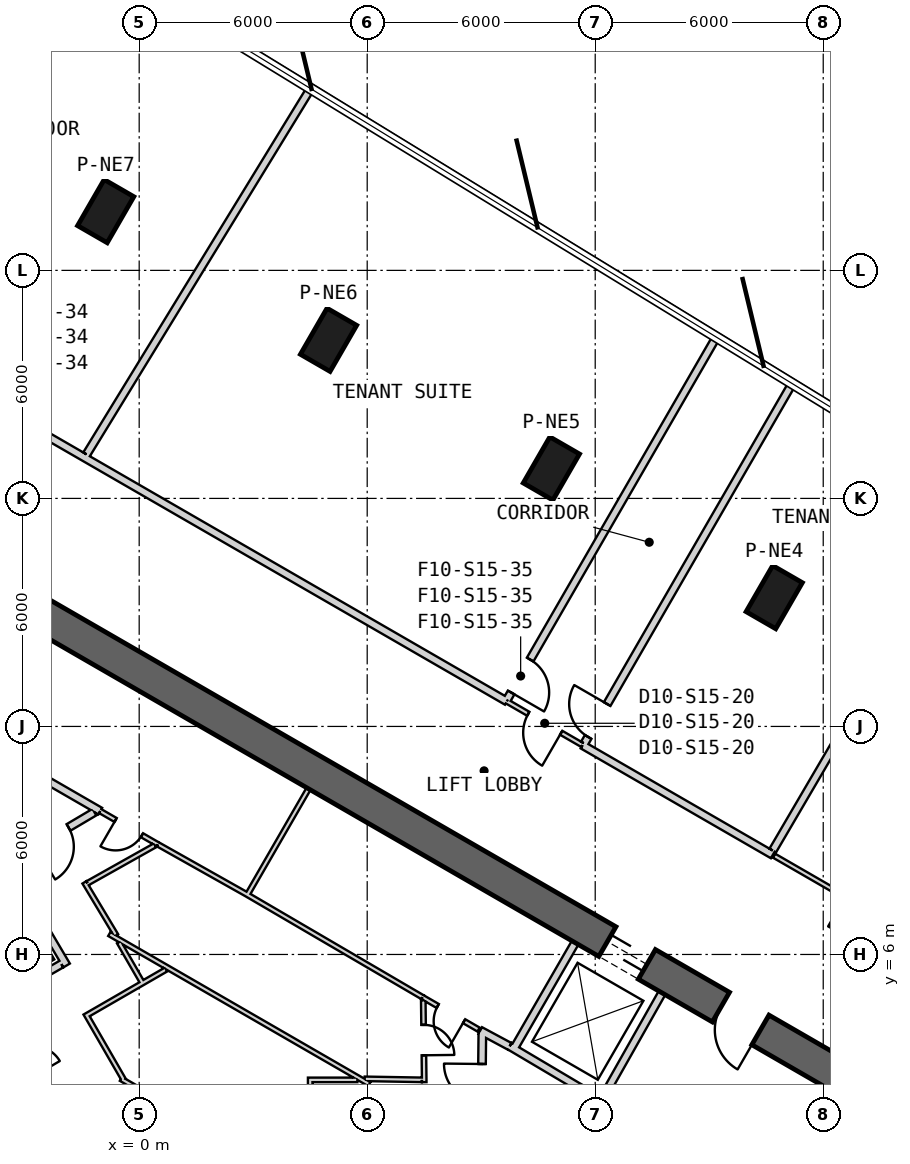
"""IFC4 building model, lengths in metres.
Left out: names, types, materials, properties, quantities, classifications, styles, units other than length and angle.
Written with IfcOpenShell. Run it as: python <this file> out.ifc"""

import sys

from ifc_helpers import new_model, si_unit, direction, frame, frame_2d, origin, origin_2d, place, context, subcontext, project, spatial, rectangle, extrude, element, fill, save


model = new_model("IFC4")
c1 = context("Model", 3, precision=1e-05, world=origin(), true_north=direction((0.0, 1.0)))
c2 = subcontext(c1, "Body", "Model", "MODEL_VIEW")
j1 = project(units=[si_unit("LENGTHUNIT", "METRE"), si_unit("PLANEANGLEUNIT", "RADIAN")], contexts=[c1])
p1 = place(None, origin())
s1 = spatial("IfcSite", under=j1, at=p1, CompositionType="ELEMENT")
p2 = place(p1, origin())
s2 = spatial("IfcBuilding", under=s1, at=p2, CompositionType="ELEMENT")
p3 = place(p2, frame((0.0, 0.0, 241.2)))
s3 = spatial("IfcBuildingStorey", under=s2, at=p3, CompositionType="ELEMENT", Elevation=241.2)
for number, where, z_axis, x_axis in (
    (1, (16.71, 15.401, 0.0), (0.0, 0.0, 1.0), (0.5, 0.866, 0.0)),
    (2, (10.847, 18.787, 0.0), (0.0, 0.0, 1.0), (0.5, 0.866, 0.0)),
    (3, (4.983, 22.172, 0.0), (0.0, 0.0, 1.0), (0.5, 0.866, 0.0)),
    (4, (-0.881, 25.558, 0.0), (0.0, 0.0, 1.0), (0.5, 0.866, 0.0)),
):
    element("IfcColumn", number, at=place(p3, frame(where, z_axis=z_axis, x_axis=x_axis)), inside=s3, PredefinedType="COLUMN", context=c2, shape_type="SweptSolid", body=[
        extrude(rectangle(XDim=1.4, YDim=0.9, at=origin_2d()), origin(), (0.0, 0.0, 1.0), 4.0),
    ])
p4 = place(p3, frame((19.475, 2.208, 0.0), z_axis=(0.0, 0.0, 1.0), x_axis=(-0.866028369851, 0.499994862586, 0.0)))
e5 = element("IfcWall", 5, at=p4, inside=s3, PredefinedType="SHEAR", context=c2, shape_type="SweptSolid", body=[
    extrude(rectangle(XDim=31.523, YDim=0.9, at=frame_2d((15.762, 0.0))), origin(), (0.0, 0.0, 1.0), 4.0),
])
p5 = place(p4, frame((7.062, 0.0, 0.0)))
e6 = element("IfcOpeningElement", 6, at=p5, cuts=e5, PredefinedType="OPENING", context=c2, shape_type="SweptSolid", body=[
    extrude(rectangle(XDim=1.2, YDim=2.4, at=frame_2d((0.6, 1.2))), frame((0.0, 0.46, 0.0), z_axis=(0.0, -1.0, 0.0), x_axis=(1.0, 0.0, 0.0)), (0.0, 0.0, 1.0), 0.92),
])
p6 = place(p4, frame((3.612, 0.0, 0.0)))
e7 = element("IfcOpeningElement", 7, at=p6, cuts=e5, PredefinedType="OPENING", context=c2, shape_type="SweptSolid", body=[
    extrude(rectangle(XDim=1.2, YDim=2.4, at=frame_2d((0.6, 1.2))), frame((0.0, 0.46, 0.0), z_axis=(0.0, -1.0, 0.0), x_axis=(1.0, 0.0, 0.0)), (0.0, 0.0, 1.0), 0.92),
])
p7 = place(p4, frame((26.712, 0.0, 0.0)))
e8 = element("IfcOpeningElement", 8, at=p7, cuts=e5, PredefinedType="OPENING", context=c2, shape_type="SweptSolid", body=[
    extrude(rectangle(XDim=1.2, YDim=2.4, at=frame_2d((0.6, 1.2))), frame((0.0, 0.46, 0.0), z_axis=(0.0, -1.0, 0.0), x_axis=(1.0, 0.0, 0.0)), (0.0, 0.0, 1.0), 0.92),
])
p8 = place(p3, frame((9.847, 3.495, 0.0), z_axis=(0.0, 0.0, 1.0), x_axis=(0.499984717929, 0.866034226713, 0.0)))
e9 = element("IfcWall", 9, at=p8, inside=s3, PredefinedType="PLUMBINGWALL", context=c2, shape_type="SweptSolid", body=[
    extrude(rectangle(XDim=3.25, YDim=0.2, at=frame_2d((1.625, 0.0))), origin(), (0.0, 0.0, 1.0), 3.7),
])
p9 = place(p3, frame((12.11, 2.073, 0.0), z_axis=(0.0, 0.0, 1.0), x_axis=(0.49196600604, 0.870614408852, 0.0)))
e10 = element("IfcWall", 10, at=p9, inside=s3, PredefinedType="PLUMBINGWALL", context=c2, shape_type="SweptSolid", body=[
    extrude(rectangle(XDim=3.35, YDim=0.2, at=frame_2d((1.675, 0.0))), origin(), (0.0, 0.0, 1.0), 3.7),
])
p10 = place(p3, frame((12.073, 2.211, 0.0), z_axis=(0.0, 0.0, 1.0), x_axis=(-0.860414880418, 0.509594185166, 0.0)))
e11 = element("IfcWall", 11, at=p10, inside=s3, PredefinedType="PLUMBINGWALL", context=c2, shape_type="SweptSolid", body=[
    extrude(rectangle(XDim=2.7, YDim=0.2, at=frame_2d((1.35, 0.0))), origin(), (0.0, 0.0, 1.0), 3.7),
])
p11 = place(p3, frame((-3.538, 8.465, 0.0), z_axis=(0.0, 0.0, 1.0), x_axis=(0.508616218331, -0.860993346345, 0.0)))
e12 = element("IfcWall", 12, at=p11, inside=s3, PredefinedType="PLUMBINGWALL", context=c2, shape_type="SweptSolid", body=[
    extrude(rectangle(XDim=3.2, YDim=0.2, at=frame_2d((1.6, 0.0))), origin(), (0.0, 0.0, 1.0), 3.7),
])
p12 = place(p3, frame((-2.047, 5.746, 0.0), z_axis=(0.0, 0.0, 1.0), x_axis=(-0.866019606374, -0.500010041276, 0.0)))
e13 = element("IfcWall", 13, at=p12, inside=s3, PredefinedType="PLUMBINGWALL", context=c2, shape_type="SweptSolid", body=[
    extrude(rectangle(XDim=2.205, YDim=0.2, at=frame_2d((1.102, 0.0))), origin(), (0.0, 0.0, 1.0), 3.7),
])
p13 = place(p3, frame((4.457, 10.359, 0.0), z_axis=(0.0, 0.0, 1.0), x_axis=(-0.500017246033, -0.866015446554, 0.0)))
e14 = element("IfcWall", 14, at=p13, inside=s3, PredefinedType="PARTITIONING", context=c2, shape_type="SweptSolid", body=[
    extrude(rectangle(XDim=3.25, YDim=0.12, at=frame_2d((1.625, 0.0))), origin(), (0.0, 0.0, 1.0), 3.7),
])
p14 = place(p3, frame((8.974, 3.999, 0.0), z_axis=(0.0, 0.0, 1.0), x_axis=(0.880917147855, -0.473270513147, 0.0)))
e15 = element("IfcWall", 15, at=p14, inside=s3, PredefinedType="PARTITIONING", context=c2, shape_type="SweptSolid", body=[
    extrude(rectangle(XDim=0.878, YDim=0.2, at=frame_2d((0.439, 0.0))), origin(), (0.0, 0.0, 1.0), 3.7),
])
p15 = place(p3, frame((2.821, 7.586, 0.0), z_axis=(0.0, 0.0, 1.0), x_axis=(0.863262357411, -0.504755487615, 0.0)))
e16 = element("IfcWall", 16, at=p15, inside=s3, PredefinedType="PARTITIONING", context=c2, shape_type="SweptSolid", body=[
    extrude(rectangle(XDim=5.37, YDim=0.12, at=frame_2d((2.685, 0.0))), origin(), (0.0, 0.0, 1.0), 3.7),
])
p16 = place(p3, frame((-1.024, 9.771, 0.0), z_axis=(0.0, 0.0, 1.0), x_axis=(0.866039397417, -0.499975761534, 0.0)))
e17 = element("IfcWall", 17, at=p16, inside=s3, PredefinedType="PARTITIONING", context=c2, shape_type="SweptSolid", body=[
    extrude(rectangle(XDim=1.752, YDim=0.12, at=frame_2d((0.876, 0.0))), origin(), (0.0, 0.0, 1.0), 3.7),
])
p17 = place(p16, frame((0.466, 0.0, 0.0)))
e18 = element("IfcOpeningElement", 18, at=p17, cuts=e17, PredefinedType="OPENING", context=c2, shape_type="SweptSolid", body=[
    extrude(rectangle(XDim=0.8, YDim=2.1, at=frame_2d((0.4, 1.05))), frame((0.0, 0.07, 0.0), z_axis=(0.0, -1.0, 0.0), x_axis=(1.0, 0.0, 0.0)), (0.0, 0.0, 1.0), 0.14),
])
p18 = place(p3, frame((7.457, 4.875, 0.0), z_axis=(0.0, 0.0, 1.0), x_axis=(0.866027945518, -0.499995597562, 0.0)))
e19 = element("IfcWall", 19, at=p18, inside=s3, PredefinedType="PARTITIONING", context=c2, shape_type="SweptSolid", body=[
    extrude(rectangle(XDim=1.702, YDim=0.12, at=frame_2d((0.851, 0.0))), origin(), (0.0, 0.0, 1.0), 3.7),
])
p19 = place(p18, frame((0.461, 0.0, 0.0)))
e20 = element("IfcOpeningElement", 20, at=p19, cuts=e19, PredefinedType="OPENING", context=c2, shape_type="SweptSolid", body=[
    extrude(rectangle(XDim=0.8, YDim=2.1, at=frame_2d((0.4, 1.05))), frame((0.0, 0.07, 0.0), z_axis=(0.0, -1.0, 0.0), x_axis=(1.0, 0.0, 0.0)), (0.0, 0.0, 1.0), 0.14),
])
p20 = place(p3, frame((-4.296, 11.66, 0.0), z_axis=(0.0, 0.0, 1.0), x_axis=(0.866027389382, -0.499996560828, 0.0)))
e21 = element("IfcWall", 21, at=p20, inside=s3, PredefinedType="PARTITIONING", context=c2, shape_type="SweptSolid", body=[
    extrude(rectangle(XDim=3.778, YDim=0.2, at=frame_2d((1.889, 0.0))), origin(), (0.0, 0.0, 1.0), 3.7),
])
p21 = place(p3, frame((0.494, 8.896, 0.0), z_axis=(0.0, 0.0, 1.0), x_axis=(0.871426548871, -0.490526013503, 0.0)))
e22 = element("IfcWall", 22, at=p21, inside=s3, PredefinedType="PARTITIONING", context=c2, shape_type="SweptSolid", body=[
    extrude(rectangle(XDim=2.67, YDim=0.12, at=frame_2d((1.335, 0.0))), origin(), (0.0, 0.0, 1.0), 3.7),
])
p22 = place(p3, frame((9.001, 1.27, 0.0), z_axis=(0.0, 0.0, 1.0), x_axis=(0.010723968736, 0.999942496594, 0.0)))
e23 = element("IfcWall", 23, at=p22, inside=s3, PredefinedType="PARTITIONING", context=c2, shape_type="SweptSolid", body=[
    extrude(rectangle(XDim=2.709, YDim=0.2, at=frame_2d((1.354, 0.0))), origin(), (0.0, 0.0, 1.0), 3.7),
])
p23 = place(p22, frame((0.848, 0.0, 0.0)))
e24 = element("IfcOpeningElement", 24, at=p23, cuts=e23, PredefinedType="OPENING", context=c2, shape_type="SweptSolid", body=[
    extrude(rectangle(XDim=1.0, YDim=2.1, at=frame_2d((0.5, 1.05))), frame((0.0, 0.11, 0.0), z_axis=(0.0, -1.0, 0.0), x_axis=(1.0, 0.0, 0.0)), (0.0, 0.0, 1.0), 0.22),
])
p24 = place(p3, frame((-1.179, 9.745, 0.0), z_axis=(0.0, 0.0, 1.0), x_axis=(-0.860630814782, -0.509229418482, 0.0)))
e25 = element("IfcWall", 25, at=p24, inside=s3, PredefinedType="PARTITIONING", context=c2, shape_type="SweptSolid", body=[
    extrude(rectangle(XDim=2.582, YDim=0.2, at=frame_2d((1.291, 0.0))), origin(), (0.0, 0.0, 1.0), 3.7),
])
p25 = place(p24, frame((0.791, 0.0, 0.0)))
e26 = element("IfcOpeningElement", 26, at=p25, cuts=e25, PredefinedType="OPENING", context=c2, shape_type="SweptSolid", body=[
    extrude(rectangle(XDim=1.0, YDim=2.1, at=frame_2d((0.5, 1.05))), frame((0.0, 0.11, 0.0), z_axis=(0.0, -1.0, 0.0), x_axis=(1.0, 0.0, 0.0)), (0.0, 0.0, 1.0), 0.22),
])
p26 = place(p3, frame((-2.057, 1.565, 0.0), z_axis=(0.0, 0.0, 1.0), x_axis=(-0.507299271879, 0.861769951176, 0.0)))
e27 = element("IfcWall", 27, at=p26, inside=s3, PredefinedType="PLUMBINGWALL", context=c2, shape_type="SweptSolid", body=[
    extrude(rectangle(XDim=3.516, YDim=0.15, at=frame_2d((1.758, 0.0))), origin(), (0.0, 0.0, 1.0), 3.7),
])
p27 = place(p26, frame((1.422, 0.0, 0.0)))
e28 = element("IfcOpeningElement", 28, at=p27, cuts=e27, PredefinedType="OPENING", context=c2, shape_type="SweptSolid", body=[
    extrude(rectangle(XDim=0.8, YDim=2.1, at=frame_2d((0.4, 1.05))), frame((0.0, 0.085, 0.0), z_axis=(0.0, -1.0, 0.0), x_axis=(1.0, 0.0, 0.0)), (0.0, 0.0, 1.0), 0.17),
])
p28 = place(p3, frame((-0.786, 6.538, 0.0), z_axis=(0.0, 0.0, 1.0), x_axis=(0.866034288228, -0.499984611377, 0.0)))
e29 = element("IfcWall", 29, at=p28, inside=s3, PredefinedType="PARTITIONING", context=c2, shape_type="SweptSolid", body=[
    extrude(rectangle(XDim=7.9, YDim=0.12, at=frame_2d((3.95, 0.0))), origin(), (0.0, 0.0, 1.0), 3.7),
])
p29 = place(p3, frame((4.44, 2.7, 0.0), z_axis=(0.0, 0.0, 1.0), x_axis=(1.0, 0.0, 0.0)))
e30 = element("IfcWall", 30, at=p29, inside=s3, PredefinedType="PARTITIONING", context=c2, shape_type="SweptSolid", body=[
    extrude(rectangle(XDim=1.302, YDim=0.12, at=frame_2d((0.651, 0.0))), origin(), (0.0, 0.0, 1.0), 3.7),
])
p30 = place(p3, frame((4.5, 0.94, 0.0), z_axis=(0.0, 0.0, 1.0), x_axis=(0.0, 1.0, 0.0)))
e31 = element("IfcWall", 31, at=p30, inside=s3, PredefinedType="PARTITIONING", context=c2, shape_type="SweptSolid", body=[
    extrude(rectangle(XDim=1.7, YDim=0.12, at=frame_2d((0.85, 0.0))), origin(), (0.0, 0.0, 1.0), 3.7),
])
p31 = place(p3, frame((-0.48, 2.727, 0.0), z_axis=(0.0, 0.0, 1.0), x_axis=(0.86601279846, -0.500021832428, 0.0)))
e32 = element("IfcWall", 32, at=p31, inside=s3, PredefinedType="PARTITIONING", context=c2, shape_type="SweptSolid", body=[
    extrude(rectangle(XDim=3.435, YDim=0.12, at=frame_2d((1.718, 0.0))), origin(), (0.0, 0.0, 1.0), 3.7),
])
p32 = place(p31, frame((1.37, 0.0, 0.0)))
e33 = element("IfcOpeningElement", 33, at=p32, cuts=e32, PredefinedType="OPENING", context=c2, shape_type="SweptSolid", body=[
    extrude(rectangle(XDim=0.8, YDim=2.1, at=frame_2d((0.4, 1.05))), frame((0.0, 0.07, 0.0), z_axis=(0.0, -1.0, 0.0), x_axis=(1.0, 0.0, 0.0)), (0.0, 0.0, 1.0), 0.14),
])
p33 = place(p3, frame((-1.414, 4.449, 0.0), z_axis=(0.0, 0.0, 1.0), x_axis=(0.500097243556, -0.865969252911, 0.0)))
e34 = element("IfcWall", 34, at=p33, inside=s3, PredefinedType="PARTITIONING", context=c2, shape_type="SweptSolid", body=[
    extrude(rectangle(XDim=2.03, YDim=0.12, at=frame_2d((1.015, 0.0))), origin(), (0.0, 0.0, 1.0), 3.7),
])
p34 = place(p3, frame((0.709, 5.605, 0.0), z_axis=(0.0, 0.0, 1.0), x_axis=(-0.8660096254, -0.500027327967, 0.0)))
e35 = element("IfcWall", 35, at=p34, inside=s3, PredefinedType="PARTITIONING", context=c2, shape_type="SweptSolid", body=[
    extrude(rectangle(XDim=2.357, YDim=0.12, at=frame_2d((1.178, 0.0))), origin(), (0.0, 0.0, 1.0), 3.7),
])
p35 = place(p3, frame((-0.532, 6.322, 0.0), z_axis=(0.0, 0.0, 1.0), x_axis=(0.50005036918, -0.865996321171, 0.0)))
e36 = element("IfcWall", 36, at=p35, inside=s3, PredefinedType="PARTITIONING", context=c2, shape_type="SweptSolid", body=[
    extrude(rectangle(XDim=1.182, YDim=0.12, at=frame_2d((0.591, 0.0))), origin(), (0.0, 0.0, 1.0), 3.7),
])
p36 = place(p3, frame((-1.443, 7.897, 0.0), z_axis=(0.0, 0.0, 1.0), x_axis=(0.514937238613, -0.85722788119, 0.0)))
e37 = element("IfcWall", 37, at=p36, inside=s3, PredefinedType="PARTITIONING", context=c2, shape_type="SweptSolid", body=[
    extrude(rectangle(XDim=1.626, YDim=0.12, at=frame_2d((0.813, 0.0))), origin(), (0.0, 0.0, 1.0), 3.7),
])
p37 = place(p3, frame((0.414, 8.871, 0.0), z_axis=(0.0, 0.0, 1.0), x_axis=(-0.871809386997, -0.48984527429, 0.0)))
e38 = element("IfcWall", 38, at=p37, inside=s3, PredefinedType="PARTITIONING", context=c2, shape_type="SweptSolid", body=[
    extrude(rectangle(XDim=2.034, YDim=0.12, at=frame_2d((1.017, 0.0))), origin(), (0.0, 0.0, 1.0), 3.7),
])
p38 = place(p3, frame((7.501, 2.64, 0.0), z_axis=(0.0, 0.0, 1.0), x_axis=(-0.01178388431, 0.999930567625, 0.0)))
e39 = element("IfcWall", 39, at=p38, inside=s3, PredefinedType="PARTITIONING", context=c2, shape_type="SweptSolid", body=[
    extrude(rectangle(XDim=2.155, YDim=0.12, at=frame_2d((1.077, 0.0))), origin(), (0.0, 0.0, 1.0), 3.7),
])
p39 = place(p38, frame((0.707, 0.0, 0.0)))
e40 = element("IfcOpeningElement", 40, at=p39, cuts=e39, PredefinedType="OPENING", context=c2, shape_type="SweptSolid", body=[
    extrude(rectangle(XDim=0.8, YDim=2.1, at=frame_2d((0.4, 1.05))), frame((0.0, 0.07, 0.0), z_axis=(0.0, -1.0, 0.0), x_axis=(1.0, 0.0, 0.0)), (0.0, 0.0, 1.0), 0.14),
])
p40 = place(p3, frame((5.934, 2.727, 0.0), z_axis=(0.0, 0.0, 1.0), x_axis=(0.999846739959, -0.017507044085, 0.0)))
e41 = element("IfcWall", 41, at=p40, inside=s3, PredefinedType="PARTITIONING", context=c2, shape_type="SweptSolid", body=[
    extrude(rectangle(XDim=1.506, YDim=0.12, at=frame_2d((0.753, 0.0))), origin(), (0.0, 0.0, 1.0), 3.7),
])
p41 = place(p3, frame((21.229, 5.988, 0.0), z_axis=(0.0, 0.0, 1.0), x_axis=(-0.866024383922, 0.50000176645, 0.0)))
e42 = element("IfcWall", 42, at=p41, inside=s3, PredefinedType="PARTITIONING", context=c2, shape_type="SweptSolid", body=[
    extrude(rectangle(XDim=5.221, YDim=0.12, at=frame_2d((2.61, 0.0))), origin(), (0.0, 0.0, 1.0), 2.98),
])
p42 = place(p41, frame((2.16, 0.0, 0.0)))
e43 = element("IfcOpeningElement", 43, at=p42, cuts=e42, PredefinedType="OPENING", context=c2, shape_type="SweptSolid", body=[
    extrude(rectangle(XDim=0.9, YDim=2.1, at=frame_2d((0.45, 1.05))), frame((0.0, 0.07, 0.0), z_axis=(0.0, -1.0, 0.0), x_axis=(1.0, 0.0, 0.0)), (0.0, 0.0, 1.0), 0.14),
])
p43 = place(p3, frame((11.667, 11.508, 0.0), z_axis=(0.0, 0.0, 1.0), x_axis=(-0.866053019151, 0.499952165731, 0.0)))
e44 = element("IfcWall", 44, at=p43, inside=s3, PredefinedType="PARTITIONING", context=c2, shape_type="SweptSolid", body=[
    extrude(rectangle(XDim=2.3, YDim=0.12, at=frame_2d((1.15, 0.0))), origin(), (0.0, 0.0, 1.0), 3.7),
])
p44 = place(p43, frame((0.65, 0.0, 0.0)))
e45 = element("IfcOpeningElement", 45, at=p44, cuts=e44, PredefinedType="OPENING", context=c2, shape_type="SweptSolid", body=[
    extrude(rectangle(XDim=1.0, YDim=2.1, at=frame_2d((0.5, 1.05))), frame((0.0, 0.07, 0.0), z_axis=(0.0, -1.0, 0.0), x_axis=(1.0, 0.0, 0.0)), (0.0, 0.0, 1.0), 0.14),
])
p45 = place(p3, frame((16.673, 8.618, 0.0), z_axis=(0.0, 0.0, 1.0), x_axis=(-0.866014659605, 0.500018609004, 0.0)))
e46 = element("IfcWall", 46, at=p45, inside=s3, PredefinedType="PARTITIONING", context=c2, shape_type="SweptSolid", body=[
    extrude(rectangle(XDim=5.78, YDim=0.2, at=frame_2d((2.89, 0.0))), origin(), (0.0, 0.0, 1.0), 2.98),
])
p46 = place(p3, frame((9.675, 12.658, 0.0), z_axis=(0.0, 0.0, 1.0), x_axis=(-0.866025327327, 0.500000132428, 0.0)))
e47 = element("IfcWall", 47, at=p46, inside=s3, PredefinedType="PARTITIONING", context=c2, shape_type="SweptSolid", body=[
    extrude(rectangle(XDim=18.443, YDim=0.2, at=frame_2d((9.222, 0.0))), origin(), (0.0, 0.0, 1.0), 2.98),
])
p47 = place(p46, frame((15.138, 0.0, 0.0)))
e48 = element("IfcOpeningElement", 48, at=p47, cuts=e47, PredefinedType="OPENING", context=c2, shape_type="SweptSolid", body=[
    extrude(rectangle(XDim=1.0, YDim=2.1, at=frame_2d((0.5, 1.05))), frame((0.0, 0.11, 0.0), z_axis=(0.0, -1.0, 0.0), x_axis=(1.0, 0.0, 0.0)), (0.0, 0.0, 1.0), 0.22),
])
p48 = place(p3, frame((15.187, 22.245, 0.0), z_axis=(0.0, 0.0, 1.0), x_axis=(-0.49999723543, -0.866026999904, 0.0)))
e49 = element("IfcWall", 49, at=p48, inside=s3, PredefinedType="PARTITIONING", context=c2, shape_type="SweptSolid", body=[
    extrude(rectangle(XDim=10.998, YDim=0.2, at=frame_2d((5.499, 0.0))), origin(), (0.0, 0.0, 1.0), 3.7),
])
p49 = place(p48, frame((9.798, 0.0, 0.0)))
e50 = element("IfcOpeningElement", 50, at=p49, cuts=e49, PredefinedType="OPENING", context=c2, shape_type="SweptSolid", body=[
    extrude(rectangle(XDim=1.0, YDim=2.1, at=frame_2d((0.5, 1.05))), frame((0.0, 0.11, 0.0), z_axis=(0.0, -1.0, 0.0), x_axis=(1.0, 0.0, 0.0)), (0.0, 0.0, 1.0), 0.22),
])
p50 = place(p3, frame((11.715, 11.55, 0.0), z_axis=(0.0, 0.0, 1.0), x_axis=(0.499999401607, 0.866025749266, 0.0)))
e51 = element("IfcWall", 51, at=p50, inside=s3, PredefinedType="PARTITIONING", context=c2, shape_type="SweptSolid", body=[
    extrude(rectangle(XDim=10.938, YDim=0.2, at=frame_2d((5.469, 0.0))), origin(), (0.0, 0.0, 1.0), 3.7),
])
p51 = place(p50, frame((0.2, 0.0, 0.0)))
e52 = element("IfcOpeningElement", 52, at=p51, cuts=e51, PredefinedType="OPENING", context=c2, shape_type="SweptSolid", body=[
    extrude(rectangle(XDim=1.0, YDim=2.1, at=frame_2d((0.5, 1.05))), frame((0.0, 0.11, 0.0), z_axis=(0.0, -1.0, 0.0), x_axis=(1.0, 0.0, 0.0)), (0.0, 0.0, 1.0), 0.22),
])
p52 = place(p3, frame((-1.385, 19.16, 0.0), z_axis=(0.0, 0.0, 1.0), x_axis=(0.522271376538, 0.852779343822, 0.0)))
e53 = element("IfcWall", 53, at=p52, inside=s3, PredefinedType="PARTITIONING", context=c2, shape_type="SweptSolid", body=[
    extrude(rectangle(XDim=11.286, YDim=0.2, at=frame_2d((5.643, 0.0))), origin(), (0.0, 0.0, 1.0), 2.98),
])
p53 = place(p3, frame((19.111, 12.903, 0.0), z_axis=(0.0, 0.0, 1.0), x_axis=(-0.505159000856, -0.863026293837, 0.0)))
e54 = element("IfcWall", 54, at=p53, inside=s3, PredefinedType="PARTITIONING", context=c2, shape_type="SweptSolid", body=[
    extrude(rectangle(XDim=4.83, YDim=0.2, at=frame_2d((2.415, 0.0))), origin(), (0.0, 0.0, 1.0), 2.98),
])
p54 = place(p23, origin())
e55 = element("IfcDoor", 55, at=p54, inside=s3, OperationType="SINGLE_SWING_LEFT", PredefinedType="USERDEFINED", context=c2, shape_type="SweptSolid", body=[
    extrude(rectangle(XDim=1.0, YDim=2.1, at=frame_2d((0.5, 1.05))), frame((0.0, 0.025, 0.0), z_axis=(0.0, -1.0, 0.0), x_axis=(1.0, 0.0, 0.0)), (0.0, 0.0, 1.0), 0.05),
])
fill(e24, e55)
p55 = place(p25, origin())
e56 = element("IfcDoor", 56, at=p55, inside=s3, OperationType="SINGLE_SWING_RIGHT", PredefinedType="USERDEFINED", context=c2, shape_type="SweptSolid", body=[
    extrude(rectangle(XDim=1.0, YDim=2.1, at=frame_2d((0.5, 1.05))), frame((0.0, 0.025, 0.0), z_axis=(0.0, -1.0, 0.0), x_axis=(1.0, 0.0, 0.0)), (0.0, 0.0, 1.0), 0.05),
])
fill(e26, e56)
p56 = place(p39, origin())
e57 = element("IfcDoor", 57, at=p56, inside=s3, OperationType="SINGLE_SWING_RIGHT", PredefinedType="USERDEFINED", context=c2, shape_type="SweptSolid", body=[
    extrude(rectangle(XDim=0.8, YDim=2.1, at=frame_2d((0.4, 1.05))), frame((0.0, 0.025, 0.0), z_axis=(0.0, -1.0, 0.0), x_axis=(1.0, 0.0, 0.0)), (0.0, 0.0, 1.0), 0.05),
])
fill(e40, e57)
p57 = place(p19, origin())
e58 = element("IfcDoor", 58, at=p57, inside=s3, OperationType="SINGLE_SWING_LEFT", PredefinedType="USERDEFINED", context=c2, shape_type="SweptSolid", body=[
    extrude(rectangle(XDim=0.8, YDim=2.1, at=frame_2d((0.4, 1.05))), frame((0.0, 0.025, 0.0), z_axis=(0.0, -1.0, 0.0), x_axis=(1.0, 0.0, 0.0)), (0.0, 0.0, 1.0), 0.05),
])
fill(e20, e58)
p58 = place(p17, origin())
e59 = element("IfcDoor", 59, at=p58, inside=s3, OperationType="SINGLE_SWING_RIGHT", PredefinedType="USERDEFINED", context=c2, shape_type="SweptSolid", body=[
    extrude(rectangle(XDim=0.8, YDim=2.1, at=frame_2d((0.4, 1.05))), frame((0.0, 0.025, 0.0), z_axis=(0.0, -1.0, 0.0), x_axis=(1.0, 0.0, 0.0)), (0.0, 0.0, 1.0), 0.05),
])
fill(e18, e59)
p59 = place(p44, origin())
e60 = element("IfcDoor", 60, at=p59, inside=s3, OperationType="SINGLE_SWING_LEFT", PredefinedType="NOTDEFINED", context=c2, shape_type="SweptSolid", body=[
    extrude(rectangle(XDim=1.0, YDim=2.1, at=frame_2d((0.5, 1.05))), frame((0.0, 0.025, 0.0), z_axis=(0.0, -1.0, 0.0), x_axis=(1.0, 0.0, 0.0)), (0.0, 0.0, 1.0), 0.05),
])
fill(e45, e60)
p60 = place(p49, origin())
e61 = element("IfcDoor", 61, at=p60, inside=s3, OperationType="SINGLE_SWING_LEFT", PredefinedType="USERDEFINED", context=c2, shape_type="SweptSolid", body=[
    extrude(rectangle(XDim=1.0, YDim=2.1, at=frame_2d((0.5, 1.05))), frame((0.0, 0.025, 0.0), z_axis=(0.0, -1.0, 0.0), x_axis=(1.0, 0.0, 0.0)), (0.0, 0.0, 1.0), 0.05),
])
fill(e50, e61)
p61 = place(p51, origin())
e62 = element("IfcDoor", 62, at=p61, inside=s3, OperationType="SINGLE_SWING_RIGHT", PredefinedType="USERDEFINED", context=c2, shape_type="SweptSolid", body=[
    extrude(rectangle(XDim=1.0, YDim=2.1, at=frame_2d((0.5, 1.05))), frame((0.0, 0.025, 0.0), z_axis=(0.0, -1.0, 0.0), x_axis=(1.0, 0.0, 0.0)), (0.0, 0.0, 1.0), 0.05),
])
fill(e52, e62)
p62 = place(p5, origin())
e63 = element("IfcDoor", 63, at=p62, inside=s3, OperationType="SLIDING_TO_LEFT", PredefinedType="USERDEFINED", context=c2, shape_type="SweptSolid", body=[
    extrude(rectangle(XDim=1.2, YDim=2.4, at=frame_2d((0.6, 1.2))), frame((0.0, 0.025, 0.0), z_axis=(0.0, -1.0, 0.0), x_axis=(1.0, 0.0, 0.0)), (0.0, 0.0, 1.0), 0.05),
])
fill(e6, e63)
p63 = place(p6, origin())
e64 = element("IfcDoor", 64, at=p63, inside=s3, OperationType="SINGLE_SWING_RIGHT", PredefinedType="USERDEFINED", context=c2, shape_type="SweptSolid", body=[
    extrude(rectangle(XDim=1.2, YDim=2.4, at=frame_2d((0.6, 1.2))), frame((0.0, 0.025, 0.0), z_axis=(0.0, -1.0, 0.0), x_axis=(1.0, 0.0, 0.0)), (0.0, 0.0, 1.0), 0.05),
])
fill(e7, e64)
save(model, sys.argv[1])
